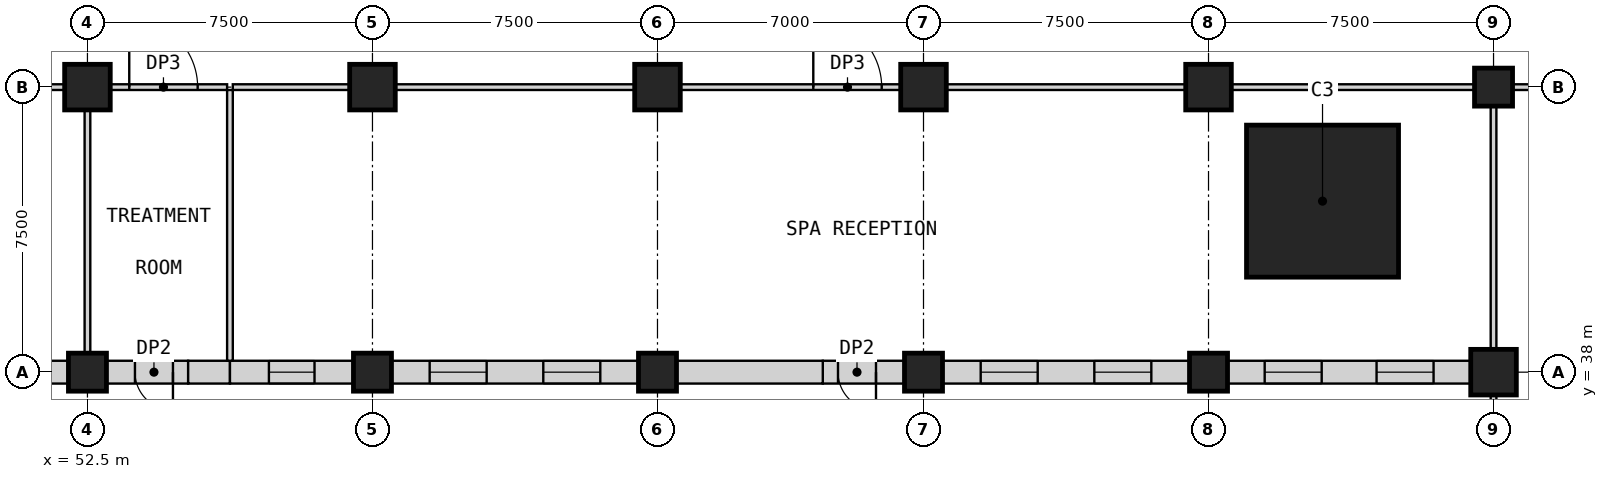
"""IFC4 building model, lengths in metres.
Left out: names, types, materials, properties, quantities, classifications, styles, units other than length and angle.
Written with IfcOpenShell. Run it as: python <this file> out.ifc"""

import sys

from ifc_helpers import new_model, si_unit, direction, frame, frame_2d, origin, origin_2d, place, context, subcontext, project, spatial, rectangle, extrude, element, fill, save


model = new_model("IFC4")
c1 = context("Model", 3, precision=1e-05, world=origin(), true_north=direction((0.0, 1.0)))
c2 = subcontext(c1, "Body", "Model", "MODEL_VIEW")
j1 = project(units=[si_unit("LENGTHUNIT", "METRE"), si_unit("PLANEANGLEUNIT", "RADIAN")], contexts=[c1])
p1 = place(None, origin())
s1 = spatial("IfcSite", under=j1, at=p1, CompositionType="ELEMENT")
p2 = place(p1, origin())
s2 = spatial("IfcBuilding", under=s1, at=p2, CompositionType="ELEMENT")
p3 = place(p2, frame((0.0, 0.0, 29.0)))
s3 = spatial("IfcBuildingStorey", under=s2, at=p3, CompositionType="ELEMENT", Elevation=29.0)
p4 = place(p3, frame((52.5, 38.0, 0.0), z_axis=(0.0, 0.0, 1.0), x_axis=(1.0, 0.0, 0.0)))
e1 = element("IfcColumn", 1, at=p4, inside=s3, PredefinedType="COLUMN", context=c2, shape_type="SweptSolid", body=[
    extrude(rectangle(XDim=1.0, YDim=1.0, at=origin_2d()), origin(), (0.0, 0.0, 1.0), 5.0),
])
p5 = place(p3, frame((52.5, 45.5, 0.0), z_axis=(0.0, 0.0, 1.0), x_axis=(1.0, 0.0, 0.0)))
e2 = element("IfcColumn", 2, at=p5, inside=s3, PredefinedType="COLUMN", context=c2, shape_type="SweptSolid", body=[
    extrude(rectangle(XDim=1.2, YDim=1.2, at=origin_2d()), origin(), (0.0, 0.0, 1.0), 5.0),
])
p6 = place(p3, frame((60.0, 38.0, 0.0), z_axis=(0.0, 0.0, 1.0), x_axis=(1.0, 0.0, 0.0)))
e3 = element("IfcColumn", 3, at=p6, inside=s3, PredefinedType="COLUMN", context=c2, shape_type="SweptSolid", body=[
    extrude(rectangle(XDim=1.0, YDim=1.0, at=origin_2d()), origin(), (0.0, 0.0, 1.0), 5.0),
])
p7 = place(p3, frame((60.0, 45.5, 0.0), z_axis=(0.0, 0.0, 1.0), x_axis=(1.0, 0.0, 0.0)))
e4 = element("IfcColumn", 4, at=p7, inside=s3, PredefinedType="COLUMN", context=c2, shape_type="SweptSolid", body=[
    extrude(rectangle(XDim=1.2, YDim=1.2, at=origin_2d()), origin(), (0.0, 0.0, 1.0), 5.0),
])
p8 = place(p3, frame((67.5, 38.0, 0.0), z_axis=(0.0, 0.0, 1.0), x_axis=(1.0, 0.0, 0.0)))
e5 = element("IfcColumn", 5, at=p8, inside=s3, PredefinedType="COLUMN", context=c2, shape_type="SweptSolid", body=[
    extrude(rectangle(XDim=1.0, YDim=1.0, at=origin_2d()), origin(), (0.0, 0.0, 1.0), 5.0),
])
p9 = place(p3, frame((67.5, 45.5, 0.0), z_axis=(0.0, 0.0, 1.0), x_axis=(1.0, 0.0, 0.0)))
e6 = element("IfcColumn", 6, at=p9, inside=s3, PredefinedType="COLUMN", context=c2, shape_type="SweptSolid", body=[
    extrude(rectangle(XDim=1.2, YDim=1.2, at=origin_2d()), origin(), (0.0, 0.0, 1.0), 5.0),
])
p10 = place(p3, frame((74.5, 38.0, 0.0), z_axis=(0.0, 0.0, 1.0), x_axis=(1.0, 0.0, 0.0)))
e7 = element("IfcColumn", 7, at=p10, inside=s3, PredefinedType="COLUMN", context=c2, shape_type="SweptSolid", body=[
    extrude(rectangle(XDim=1.0, YDim=1.0, at=origin_2d()), origin(), (0.0, 0.0, 1.0), 5.0),
])
p11 = place(p3, frame((74.5, 45.5, 0.0), z_axis=(0.0, 0.0, 1.0), x_axis=(1.0, 0.0, 0.0)))
e8 = element("IfcColumn", 8, at=p11, inside=s3, PredefinedType="COLUMN", context=c2, shape_type="SweptSolid", body=[
    extrude(rectangle(XDim=1.2, YDim=1.2, at=origin_2d()), origin(), (0.0, 0.0, 1.0), 5.0),
])
p12 = place(p3, frame((82.0, 38.0, 0.0), z_axis=(0.0, 0.0, 1.0), x_axis=(1.0, 0.0, 0.0)))
e9 = element("IfcColumn", 9, at=p12, inside=s3, PredefinedType="COLUMN", context=c2, shape_type="SweptSolid", body=[
    extrude(rectangle(XDim=1.0, YDim=1.0, at=origin_2d()), origin(), (0.0, 0.0, 1.0), 5.0),
])
p13 = place(p3, frame((82.0, 45.5, 0.0), z_axis=(0.0, 0.0, 1.0), x_axis=(1.0, 0.0, 0.0)))
e10 = element("IfcColumn", 10, at=p13, inside=s3, PredefinedType="COLUMN", context=c2, shape_type="SweptSolid", body=[
    extrude(rectangle(XDim=1.2, YDim=1.2, at=origin_2d()), origin(), (0.0, 0.0, 1.0), 5.0),
])
p14 = place(p3, frame((89.5, 45.5, 0.0), z_axis=(0.0, 0.0, 1.0), x_axis=(1.0, 0.0, 0.0)))
e11 = element("IfcColumn", 11, at=p14, inside=s3, PredefinedType="COLUMN", context=c2, shape_type="SweptSolid", body=[
    extrude(rectangle(XDim=1.0, YDim=1.0, at=origin_2d()), origin(), (0.0, 0.0, 1.0), 5.0),
])
p15 = place(p3, frame((85.0, 42.5, 0.0), z_axis=(0.0, 0.0, 1.0), x_axis=(1.0, 0.0, 0.0)))
e12 = element("IfcColumn", 12, at=p15, inside=s3, PredefinedType="COLUMN", context=c2, shape_type="SweptSolid", body=[
    extrude(rectangle(XDim=4.0, YDim=4.0, at=origin_2d()), origin(), (0.0, 0.0, 1.0), 5.0),
])
p16 = place(p3, frame((89.5, 38.0, 0.0), z_axis=(0.0, 0.0, 1.0), x_axis=(1.0, 0.0, 0.0)))
e13 = element("IfcColumn", 13, at=p16, inside=s3, PredefinedType="COLUMN", context=c2, shape_type="SweptSolid", body=[
    extrude(rectangle(XDim=1.2, YDim=1.2, at=origin_2d()), origin(), (0.0, 0.0, 1.0), 5.0),
])
p17 = place(p3, frame((45.6, 45.5, 0.0), z_axis=(0.0, 0.0, 1.0), x_axis=(1.0, 0.0, 0.0)))
e14 = element("IfcWall", 14, at=p17, inside=s3, PredefinedType="PARTITIONING", context=c2, shape_type="SweptSolid", body=[
    extrude(rectangle(XDim=6.3, YDim=0.15, at=frame_2d((3.15, 0.0))), origin(), (0.0, 0.0, 1.0), 4.7),
])
p18 = place(p17, frame((2.25, 0.0, 0.0)))
e15 = element("IfcOpeningElement", 15, at=p18, cuts=e14, PredefinedType="OPENING", context=c2, shape_type="SweptSolid", body=[
    extrude(rectangle(XDim=1.8, YDim=2.4, at=frame_2d((0.9, 1.2))), frame((0.0, 0.085, 0.0), z_axis=(0.0, -1.0, 0.0), x_axis=(1.0, 0.0, 0.0)), (0.0, 0.0, 1.0), 0.17),
])
p19 = place(p3, frame((53.1, 45.5, 0.0), z_axis=(0.0, 0.0, 1.0), x_axis=(1.0, 0.0, 0.0)))
e16 = element("IfcWall", 16, at=p19, inside=s3, PredefinedType="PARTITIONING", context=c2, shape_type="SweptSolid", body=[
    extrude(rectangle(XDim=3.075, YDim=0.15, at=frame_2d((1.538, 0.0))), origin(), (0.0, 0.0, 1.0), 4.7),
])
p20 = place(p19, frame((0.5, 0.0, 0.0)))
e17 = element("IfcOpeningElement", 17, at=p20, cuts=e16, PredefinedType="OPENING", context=c2, shape_type="SweptSolid", body=[
    extrude(rectangle(XDim=1.8, YDim=2.4, at=frame_2d((0.9, 1.2))), frame((0.0, 0.085, 0.0), z_axis=(0.0, -1.0, 0.0), x_axis=(1.0, 0.0, 0.0)), (0.0, 0.0, 1.0), 0.17),
])
p21 = place(p3, frame((56.325, 45.5, 0.0), z_axis=(0.0, 0.0, 1.0), x_axis=(1.0, 0.0, 0.0)))
e18 = element("IfcWall", 18, at=p21, inside=s3, PredefinedType="PARTITIONING", context=c2, shape_type="SweptSolid", body=[
    extrude(rectangle(XDim=3.075, YDim=0.15, at=frame_2d((1.538, 0.0))), origin(), (0.0, 0.0, 1.0), 4.7),
])
p22 = place(p3, frame((60.6, 45.5, 0.0), z_axis=(0.0, 0.0, 1.0), x_axis=(1.0, 0.0, 0.0)))
e19 = element("IfcWall", 19, at=p22, inside=s3, PredefinedType="PARTITIONING", context=c2, shape_type="SweptSolid", body=[
    extrude(rectangle(XDim=6.3, YDim=0.15, at=frame_2d((3.15, 0.0))), origin(), (0.0, 0.0, 1.0), 4.7),
])
p23 = place(p3, frame((68.1, 45.5, 0.0), z_axis=(0.0, 0.0, 1.0), x_axis=(1.0, 0.0, 0.0)))
e20 = element("IfcWall", 20, at=p23, inside=s3, PredefinedType="PARTITIONING", context=c2, shape_type="SweptSolid", body=[
    extrude(rectangle(XDim=5.8, YDim=0.15, at=frame_2d((2.9, 0.0))), origin(), (0.0, 0.0, 1.0), 4.7),
])
p24 = place(p23, frame((3.5, 0.0, 0.0)))
e21 = element("IfcOpeningElement", 21, at=p24, cuts=e20, PredefinedType="OPENING", context=c2, shape_type="SweptSolid", body=[
    extrude(rectangle(XDim=1.8, YDim=2.4, at=frame_2d((0.9, 1.2))), frame((0.0, 0.085, 0.0), z_axis=(0.0, -1.0, 0.0), x_axis=(1.0, 0.0, 0.0)), (0.0, 0.0, 1.0), 0.17),
])
p25 = place(p3, frame((75.1, 45.5, 0.0), z_axis=(0.0, 0.0, 1.0), x_axis=(1.0, 0.0, 0.0)))
e22 = element("IfcWall", 22, at=p25, inside=s3, PredefinedType="PARTITIONING", context=c2, shape_type="SweptSolid", body=[
    extrude(rectangle(XDim=6.3, YDim=0.15, at=frame_2d((3.15, 0.0))), origin(), (0.0, 0.0, 1.0), 4.7),
])
for number, where, z_axis, x_axis in (
    (23, (82.6, 45.5, 0.0), (0.0, 0.0, 1.0), (1.0, 0.0, 0.0)),
    (24, (90.0, 45.5, 0.0), (0.0, 0.0, 1.0), (1.0, 0.0, 0.0)),
):
    element("IfcWall", number, at=place(p3, frame(where, z_axis=z_axis, x_axis=x_axis)), inside=s3, PredefinedType="PARTITIONING", context=c2, shape_type="SweptSolid", body=[
        extrude(rectangle(XDim=6.4, YDim=0.15, at=frame_2d((3.2, 0.0))), origin(), (0.0, 0.0, 1.0), 4.7),
    ])
p26 = place(p3, frame((49.65, 38.0, 0.0), z_axis=(0.0, 0.0, 1.0), x_axis=(1.0, 0.0, 0.0)))
e25 = element("IfcWall", 25, at=p26, inside=s3, PredefinedType="PARTITIONING", context=c2, shape_type="SweptSolid", body=[
    extrude(rectangle(XDim=2.35, YDim=0.6, at=frame_2d((1.175, 0.0))), origin(), (0.0, 0.0, 1.0), 4.25),
])
p27 = place(p3, frame((55.15, 38.0, 0.0), z_axis=(0.0, 0.0, 1.0), x_axis=(-1.0, 0.0, 0.0)))
e26 = element("IfcWall", 26, at=p27, inside=s3, PredefinedType="PARTITIONING", context=c2, shape_type="SweptSolid", body=[
    extrude(rectangle(XDim=2.15, YDim=0.6, at=frame_2d((1.075, 0.0))), origin(), (0.0, 0.0, 1.0), 4.25),
])
p28 = place(p27, frame((0.4, 0.0, 0.0)))
e27 = element("IfcOpeningElement", 27, at=p28, cuts=e26, PredefinedType="OPENING", context=c2, shape_type="SweptSolid", body=[
    extrude(rectangle(XDim=1.0, YDim=2.1, at=frame_2d((0.5, 1.05))), frame((0.0, 0.31, 0.0), z_axis=(0.0, -1.0, 0.0), x_axis=(1.0, 0.0, 0.0)), (0.0, 0.0, 1.0), 0.62),
])
p29 = place(p3, frame((55.15, 38.0, 0.0), z_axis=(0.0, 0.0, 1.0), x_axis=(1.0, 0.0, 0.0)))
e28 = element("IfcWall", 28, at=p29, inside=s3, PredefinedType="PARTITIONING", context=c2, shape_type="SweptSolid", body=[
    extrude(rectangle(XDim=1.1, YDim=0.6, at=frame_2d((0.55, 0.0))), origin(), (0.0, 0.0, 1.0), 4.25),
])
p30 = place(p3, frame((56.25, 38.0, 0.0), z_axis=(0.0, 0.0, 1.0), x_axis=(1.0, 0.0, 0.0)))
e29 = element("IfcWall", 29, at=p30, inside=s3, PredefinedType="PARTITIONING", context=c2, shape_type="SweptSolid", body=[
    extrude(rectangle(XDim=3.25, YDim=0.6, at=frame_2d((1.625, 0.0))), origin(), (0.0, 0.0, 1.0), 4.25),
])
p31 = place(p30, frame((1.025, 0.0, 0.9)))
e30 = element("IfcOpeningElement", 30, at=p31, cuts=e29, PredefinedType="OPENING", context=c2, shape_type="SweptSolid", body=[
    extrude(rectangle(XDim=1.2, YDim=2.8, at=frame_2d((0.6, 1.4))), frame((0.0, 0.31, 0.0), z_axis=(0.0, -1.0, 0.0), x_axis=(1.0, 0.0, 0.0)), (0.0, 0.0, 1.0), 0.62),
])
p32 = place(p3, frame((60.5, 38.0, 0.0), z_axis=(0.0, 0.0, 1.0), x_axis=(1.0, 0.0, 0.0)))
e31 = element("IfcWall", 31, at=p32, inside=s3, PredefinedType="PARTITIONING", context=c2, shape_type="SweptSolid", body=[
    extrude(rectangle(XDim=6.5, YDim=0.6, at=frame_2d((3.25, 0.0))), origin(), (0.0, 0.0, 1.0), 4.25),
])
p33 = place(p32, frame((1.005, 0.0, 0.9)))
e32 = element("IfcOpeningElement", 32, at=p33, cuts=e31, PredefinedType="OPENING", context=c2, shape_type="SweptSolid", body=[
    extrude(rectangle(XDim=1.5, YDim=2.8, at=frame_2d((0.75, 1.4))), frame((0.0, 0.31, 0.0), z_axis=(0.0, -1.0, 0.0), x_axis=(1.0, 0.0, 0.0)), (0.0, 0.0, 1.0), 0.62),
])
p34 = place(p32, frame((3.995, 0.0, 0.9)))
e33 = element("IfcOpeningElement", 33, at=p34, cuts=e31, PredefinedType="OPENING", context=c2, shape_type="SweptSolid", body=[
    extrude(rectangle(XDim=1.5, YDim=2.8, at=frame_2d((0.75, 1.4))), frame((0.0, 0.31, 0.0), z_axis=(0.0, -1.0, 0.0), x_axis=(1.0, 0.0, 0.0)), (0.0, 0.0, 1.0), 0.62),
])
p35 = place(p3, frame((74.0, 38.0, 0.0), z_axis=(0.0, 0.0, 1.0), x_axis=(-1.0, 0.0, 0.0)))
e34 = element("IfcWall", 34, at=p35, inside=s3, PredefinedType="PARTITIONING", context=c2, shape_type="SweptSolid", body=[
    extrude(rectangle(XDim=2.15, YDim=0.6, at=frame_2d((1.075, 0.0))), origin(), (0.0, 0.0, 1.0), 4.25),
])
p36 = place(p35, frame((0.75, 0.0, 0.0)))
e35 = element("IfcOpeningElement", 35, at=p36, cuts=e34, PredefinedType="OPENING", context=c2, shape_type="SweptSolid", body=[
    extrude(rectangle(XDim=1.0, YDim=2.1, at=frame_2d((0.5, 1.05))), frame((0.0, 0.31, 0.0), z_axis=(0.0, -1.0, 0.0), x_axis=(1.0, 0.0, 0.0)), (0.0, 0.0, 1.0), 0.62),
])
p37 = place(p3, frame((68.0, 38.0, 0.0), z_axis=(0.0, 0.0, 1.0), x_axis=(1.0, 0.0, 0.0)))
e36 = element("IfcWall", 36, at=p37, inside=s3, PredefinedType="PARTITIONING", context=c2, shape_type="SweptSolid", body=[
    extrude(rectangle(XDim=3.85, YDim=0.6, at=frame_2d((1.925, 0.0))), origin(), (0.0, 0.0, 1.0), 4.25),
])
p38 = place(p3, frame((75.0, 38.0, 0.0), z_axis=(0.0, 0.0, 1.0), x_axis=(1.0, 0.0, 0.0)))
e37 = element("IfcWall", 37, at=p38, inside=s3, PredefinedType="PARTITIONING", context=c2, shape_type="SweptSolid", body=[
    extrude(rectangle(XDim=6.5, YDim=0.6, at=frame_2d((3.25, 0.0))), origin(), (0.0, 0.0, 1.0), 4.25),
])
p39 = place(p38, frame((1.005, 0.0, 0.9)))
e38 = element("IfcOpeningElement", 38, at=p39, cuts=e37, PredefinedType="OPENING", context=c2, shape_type="SweptSolid", body=[
    extrude(rectangle(XDim=1.5, YDim=2.8, at=frame_2d((0.75, 1.4))), frame((0.0, 0.31, 0.0), z_axis=(0.0, -1.0, 0.0), x_axis=(1.0, 0.0, 0.0)), (0.0, 0.0, 1.0), 0.62),
])
p40 = place(p38, frame((3.995, 0.0, 0.9)))
e39 = element("IfcOpeningElement", 39, at=p40, cuts=e37, PredefinedType="OPENING", context=c2, shape_type="SweptSolid", body=[
    extrude(rectangle(XDim=1.5, YDim=2.8, at=frame_2d((0.75, 1.4))), frame((0.0, 0.31, 0.0), z_axis=(0.0, -1.0, 0.0), x_axis=(1.0, 0.0, 0.0)), (0.0, 0.0, 1.0), 0.62),
])
p41 = place(p3, frame((82.5, 38.0, 0.0), z_axis=(0.0, 0.0, 1.0), x_axis=(1.0, 0.0, 0.0)))
e40 = element("IfcWall", 40, at=p41, inside=s3, PredefinedType="PARTITIONING", context=c2, shape_type="SweptSolid", body=[
    extrude(rectangle(XDim=6.4, YDim=0.6, at=frame_2d((3.2, 0.0))), origin(), (0.0, 0.0, 1.0), 4.7),
])
p42 = place(p41, frame((0.978, 0.0, 0.9)))
e41 = element("IfcOpeningElement", 41, at=p42, cuts=e40, PredefinedType="OPENING", context=c2, shape_type="SweptSolid", body=[
    extrude(rectangle(XDim=1.5, YDim=2.8, at=frame_2d((0.75, 1.4))), frame((0.0, 0.31, 0.0), z_axis=(0.0, -1.0, 0.0), x_axis=(1.0, 0.0, 0.0)), (0.0, 0.0, 1.0), 0.62),
])
p43 = place(p41, frame((3.922, 0.0, 0.9)))
e42 = element("IfcOpeningElement", 42, at=p43, cuts=e40, PredefinedType="OPENING", context=c2, shape_type="SweptSolid", body=[
    extrude(rectangle(XDim=1.5, YDim=2.8, at=frame_2d((0.75, 1.4))), frame((0.0, 0.31, 0.0), z_axis=(0.0, -1.0, 0.0), x_axis=(1.0, 0.0, 0.0)), (0.0, 0.0, 1.0), 0.62),
])
p44 = place(p3, frame((52.5, 38.5, 0.0), z_axis=(0.0, 0.0, 1.0), x_axis=(0.0, 1.0, 0.0)))
e43 = element("IfcWall", 43, at=p44, inside=s3, PredefinedType="PARTITIONING", context=c2, shape_type="SweptSolid", body=[
    extrude(rectangle(XDim=6.4, YDim=0.15, at=frame_2d((3.2, 0.0))), origin(), (0.0, 0.0, 1.0), 4.7),
])
p45 = place(p3, frame((56.25, 38.3, 0.0), z_axis=(0.0, 0.0, 1.0), x_axis=(0.0, 1.0, 0.0)))
e44 = element("IfcWall", 44, at=p45, inside=s3, PredefinedType="PARTITIONING", context=c2, shape_type="SweptSolid", body=[
    extrude(rectangle(XDim=7.125, YDim=0.15, at=frame_2d((3.562, 0.0))), origin(), (0.0, 0.0, 1.0), 4.7),
])
p46 = place(p3, frame((89.5, 31.1, 0.0), z_axis=(0.0, 0.0, 1.0), x_axis=(0.0, 1.0, 0.0)))
e45 = element("IfcWall", 45, at=p46, inside=s3, PredefinedType="PARTITIONING", context=c2, shape_type="SweptSolid", body=[
    extrude(rectangle(XDim=6.3, YDim=0.15, at=frame_2d((3.15, 0.0))), origin(), (0.0, 0.0, 1.0), 4.7),
])
p47 = place(p3, frame((89.5, 38.6, 0.0), z_axis=(0.0, 0.0, 1.0), x_axis=(0.0, 1.0, 0.0)))
e46 = element("IfcWall", 46, at=p47, inside=s3, PredefinedType="PARTITIONING", context=c2, shape_type="SweptSolid", body=[
    extrude(rectangle(XDim=6.4, YDim=0.15, at=frame_2d((3.2, 0.0))), origin(), (0.0, 0.0, 1.0), 4.7),
])
p48 = place(p20, origin())
e47 = element("IfcDoor", 47, at=p48, inside=s3, OperationType="SINGLE_SWING_LEFT", PredefinedType="DOOR", context=c2, shape_type="SweptSolid", body=[
    extrude(rectangle(XDim=1.8, YDim=2.4, at=frame_2d((0.9, 1.2))), frame((0.0, 0.025, 0.0), z_axis=(0.0, -1.0, 0.0), x_axis=(1.0, 0.0, 0.0)), (0.0, 0.0, 1.0), 0.05),
])
fill(e17, e47)
p49 = place(p24, origin())
e48 = element("IfcDoor", 48, at=p49, inside=s3, OperationType="SINGLE_SWING_LEFT", PredefinedType="DOOR", context=c2, shape_type="SweptSolid", body=[
    extrude(rectangle(XDim=1.8, YDim=2.4, at=frame_2d((0.9, 1.2))), frame((0.0, 0.025, 0.0), z_axis=(0.0, -1.0, 0.0), x_axis=(1.0, 0.0, 0.0)), (0.0, 0.0, 1.0), 0.05),
])
fill(e21, e48)
p50 = place(p28, origin())
e49 = element("IfcDoor", 49, at=p50, inside=s3, OperationType="SINGLE_SWING_LEFT", PredefinedType="DOOR", context=c2, shape_type="SweptSolid", body=[
    extrude(rectangle(XDim=1.0, YDim=2.1, at=frame_2d((0.5, 1.05))), frame((0.0, 0.025, 0.0), z_axis=(0.0, -1.0, 0.0), x_axis=(1.0, 0.0, 0.0)), (0.0, 0.0, 1.0), 0.05),
])
fill(e27, e49)
p51 = place(p31, origin())
e50 = element("IfcWindow", 50, at=p51, inside=s3, PartitioningType="SINGLE_PANEL", PredefinedType="WINDOW", context=c2, shape_type="SweptSolid", body=[
    extrude(rectangle(XDim=1.2, YDim=2.8, at=frame_2d((0.6, 1.4))), frame((0.0, 0.03, 0.0), z_axis=(0.0, -1.0, 0.0), x_axis=(1.0, 0.0, 0.0)), (0.0, 0.0, 1.0), 0.06),
])
fill(e30, e50)
p52 = place(p33, origin())
e51 = element("IfcWindow", 51, at=p52, inside=s3, PartitioningType="SINGLE_PANEL", PredefinedType="WINDOW", context=c2, shape_type="SweptSolid", body=[
    extrude(rectangle(XDim=1.5, YDim=2.8, at=frame_2d((0.75, 1.4))), frame((0.0, 0.03, 0.0), z_axis=(0.0, -1.0, 0.0), x_axis=(1.0, 0.0, 0.0)), (0.0, 0.0, 1.0), 0.06),
])
fill(e32, e51)
p53 = place(p34, origin())
e52 = element("IfcWindow", 52, at=p53, inside=s3, PartitioningType="SINGLE_PANEL", PredefinedType="WINDOW", context=c2, shape_type="SweptSolid", body=[
    extrude(rectangle(XDim=1.5, YDim=2.8, at=frame_2d((0.75, 1.4))), frame((0.0, 0.03, 0.0), z_axis=(0.0, -1.0, 0.0), x_axis=(1.0, 0.0, 0.0)), (0.0, 0.0, 1.0), 0.06),
])
fill(e33, e52)
p54 = place(p36, origin())
e53 = element("IfcDoor", 53, at=p54, inside=s3, OperationType="SINGLE_SWING_LEFT", PredefinedType="DOOR", context=c2, shape_type="SweptSolid", body=[
    extrude(rectangle(XDim=1.0, YDim=2.1, at=frame_2d((0.5, 1.05))), frame((0.0, 0.025, 0.0), z_axis=(0.0, -1.0, 0.0), x_axis=(1.0, 0.0, 0.0)), (0.0, 0.0, 1.0), 0.05),
])
fill(e35, e53)
p55 = place(p39, origin())
e54 = element("IfcWindow", 54, at=p55, inside=s3, PartitioningType="SINGLE_PANEL", PredefinedType="WINDOW", context=c2, shape_type="SweptSolid", body=[
    extrude(rectangle(XDim=1.5, YDim=2.8, at=frame_2d((0.75, 1.4))), frame((0.0, 0.03, 0.0), z_axis=(0.0, -1.0, 0.0), x_axis=(1.0, 0.0, 0.0)), (0.0, 0.0, 1.0), 0.06),
])
fill(e38, e54)
p56 = place(p40, origin())
e55 = element("IfcWindow", 55, at=p56, inside=s3, PartitioningType="SINGLE_PANEL", PredefinedType="WINDOW", context=c2, shape_type="SweptSolid", body=[
    extrude(rectangle(XDim=1.5, YDim=2.8, at=frame_2d((0.75, 1.4))), frame((0.0, 0.03, 0.0), z_axis=(0.0, -1.0, 0.0), x_axis=(1.0, 0.0, 0.0)), (0.0, 0.0, 1.0), 0.06),
])
fill(e39, e55)
p57 = place(p42, origin())
e56 = element("IfcWindow", 56, at=p57, inside=s3, PartitioningType="SINGLE_PANEL", PredefinedType="WINDOW", context=c2, shape_type="SweptSolid", body=[
    extrude(rectangle(XDim=1.5, YDim=2.8, at=frame_2d((0.75, 1.4))), frame((0.0, 0.03, 0.0), z_axis=(0.0, -1.0, 0.0), x_axis=(1.0, 0.0, 0.0)), (0.0, 0.0, 1.0), 0.06),
])
fill(e41, e56)
p58 = place(p43, origin())
e57 = element("IfcWindow", 57, at=p58, inside=s3, PartitioningType="SINGLE_PANEL", PredefinedType="WINDOW", context=c2, shape_type="SweptSolid", body=[
    extrude(rectangle(XDim=1.5, YDim=2.8, at=frame_2d((0.75, 1.4))), frame((0.0, 0.03, 0.0), z_axis=(0.0, -1.0, 0.0), x_axis=(1.0, 0.0, 0.0)), (0.0, 0.0, 1.0), 0.06),
])
fill(e42, e57)
save(model, sys.argv[1])
